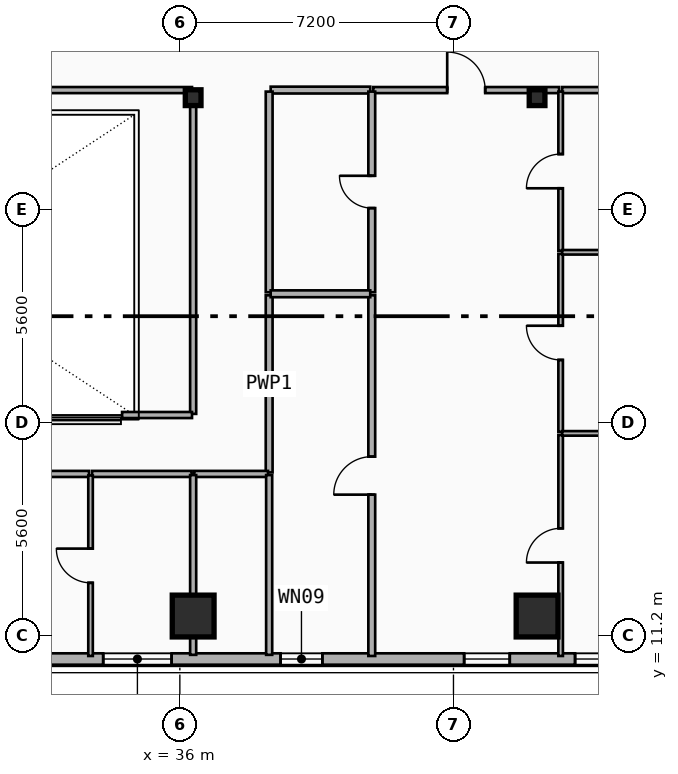
"""IFC4 building model, lengths in metres.
Left out: names, types, materials, properties, quantities, classifications, styles, units other than length and angle.
Written with IfcOpenShell. Run it as: python <this file> out.ifc"""

import sys

from ifc_helpers import new_model, si_unit, direction, frame, frame_2d, origin, origin_2d, place, context, subcontext, project, spatial, rectangle, i_section, extrude, element, fill, save


model = new_model("IFC4")
c1 = context("Model", 3, precision=1e-05, world=origin(), true_north=direction((0.0, 1.0)))
c2 = subcontext(c1, "Body", "Model", "MODEL_VIEW")
j1 = project(units=[si_unit("LENGTHUNIT", "METRE"), si_unit("PLANEANGLEUNIT", "RADIAN")], contexts=[c1])
p1 = place(None, origin())
s1 = spatial("IfcSite", under=j1, at=p1, CompositionType="ELEMENT")
p2 = place(p1, origin())
s2 = spatial("IfcBuilding", under=s1, at=p2, CompositionType="ELEMENT")
p3 = place(p2, frame((0.0, 0.0, 159.0)))
s3 = spatial("IfcBuildingStorey", under=s2, at=p3, CompositionType="ELEMENT", Elevation=159.0)
for number, where, z_axis, x_axis in (
    (1, (36.35, 25.35, 0.0), (0.0, 0.0, 1.0), (1.0, 0.0, 0.0)),
    (2, (45.4, 25.35, 0.0), (0.0, 0.0, 1.0), (1.0, 0.0, 0.0)),
):
    element("IfcColumn", number, at=place(p3, frame(where, z_axis=z_axis, x_axis=x_axis)), inside=s3, PredefinedType="COLUMN", context=c2, shape_type="SweptSolid", body=[
        extrude(i_section(OverallWidth=0.413, OverallDepth=0.415, WebThickness=0.03, FlangeThickness=0.047, FilletRadius=0.015, at=origin_2d()), origin(), (0.0, 0.0, 1.0), 3.55),
    ])
for number, where, z_axis, x_axis in (
    (3, (36.35, 11.819, 0.0), (0.0, -0.09, 0.996), (1.0, 0.0, 0.0)),
    (4, (45.4, 11.819, 0.0), (0.0, -0.09, 0.996), (1.0, 0.0, 0.0)),
):
    element("IfcColumn", number, at=place(p3, frame(where, z_axis=z_axis, x_axis=x_axis)), inside=s3, PredefinedType="COLUMN", context=c2, shape_type="SweptSolid", body=[
        extrude(rectangle(XDim=1.1, YDim=1.1, at=origin_2d()), origin(), (0.0, 0.0, 1.0), 3.565),
    ])
p4 = place(p3, frame((48.0, 10.58, 0.0), z_axis=(0.0, 0.0, 1.0), x_axis=(-1.0, 0.0, 0.0)))
e5 = element("IfcWall", 5, at=p4, inside=s3, PredefinedType="SOLIDWALL", context=c2, shape_type="SweptSolid", body=[
    extrude(rectangle(XDim=38.4, YDim=0.3, at=frame_2d((19.2, 0.0))), origin(), (0.0, 0.0, 1.0), 3.29),
])
p5 = place(p4, frame((36.407, 0.0, 0.75)))
e6 = element("IfcOpeningElement", 6, at=p5, cuts=e5, PredefinedType="OPENING", context=c2, shape_type="SweptSolid", body=[
    extrude(rectangle(XDim=1.6, YDim=1.95, at=frame_2d((0.8, 0.975))), frame((0.0, 0.16, 0.0), z_axis=(0.0, -1.0, 0.0), x_axis=(1.0, 0.0, 0.0)), (0.0, 0.0, 1.0), 0.32),
])
p6 = place(p4, frame((33.866, 0.0, 0.34)))
e7 = element("IfcOpeningElement", 7, at=p6, cuts=e5, PredefinedType="OPENING", context=c2, shape_type="SweptSolid", body=[
    extrude(rectangle(XDim=1.4, YDim=1.8, at=frame_2d((0.7, 0.9))), frame((0.0, 0.16, 0.0), z_axis=(0.0, -1.0, 0.0), x_axis=(1.0, 0.0, 0.0)), (0.0, 0.0, 1.0), 0.32),
])
p7 = place(p4, frame((27.319, 0.0, 1.05)))
e8 = element("IfcOpeningElement", 8, at=p7, cuts=e5, PredefinedType="OPENING", context=c2, shape_type="SweptSolid", body=[
    extrude(rectangle(XDim=1.2, YDim=1.5, at=frame_2d((0.6, 0.75))), frame((0.0, 0.16, 0.0), z_axis=(0.0, -1.0, 0.0), x_axis=(1.0, 0.0, 0.0)), (0.0, 0.0, 1.0), 0.32),
])
p8 = place(p4, frame((15.608, 0.0, 0.65)))
e9 = element("IfcOpeningElement", 9, at=p8, cuts=e5, PredefinedType="OPENING", context=c2, shape_type="SweptSolid", body=[
    extrude(rectangle(XDim=2.1, YDim=2.1, at=frame_2d((1.05, 1.05))), frame((0.0, 0.16, 0.0), z_axis=(0.0, -1.0, 0.0), x_axis=(1.0, 0.0, 0.0)), (0.0, 0.0, 1.0), 0.32),
])
p9 = place(p4, frame((22.175, 0.0, 0.65)))
e10 = element("IfcOpeningElement", 10, at=p9, cuts=e5, PredefinedType="OPENING", context=c2, shape_type="SweptSolid", body=[
    extrude(rectangle(XDim=2.1, YDim=2.1, at=frame_2d((1.05, 1.05))), frame((0.0, 0.16, 0.0), z_axis=(0.0, -1.0, 0.0), x_axis=(1.0, 0.0, 0.0)), (0.0, 0.0, 1.0), 0.32),
])
p10 = place(p4, frame((12.217, 0.0, 0.34)))
e11 = element("IfcOpeningElement", 11, at=p10, cuts=e5, PredefinedType="OPENING", context=c2, shape_type="SweptSolid", body=[
    extrude(rectangle(XDim=1.8, YDim=1.8, at=frame_2d((0.9, 0.9))), frame((0.0, 0.16, 0.0), z_axis=(0.0, -1.0, 0.0), x_axis=(1.0, 0.0, 0.0)), (0.0, 0.0, 1.0), 0.32),
])
p11 = place(p4, frame((3.319, 0.0, 1.05)))
e12 = element("IfcOpeningElement", 12, at=p11, cuts=e5, PredefinedType="OPENING", context=c2, shape_type="SweptSolid", body=[
    extrude(rectangle(XDim=1.2, YDim=1.5, at=frame_2d((0.6, 0.75))), frame((0.0, 0.16, 0.0), z_axis=(0.0, -1.0, 0.0), x_axis=(1.0, 0.0, 0.0)), (0.0, 0.0, 1.0), 0.32),
])
p12 = place(p4, frame((8.25, 0.0, 0.52)))
e13 = element("IfcOpeningElement", 13, at=p12, cuts=e5, PredefinedType="OPENING", context=c2, shape_type="SweptSolid", body=[
    extrude(rectangle(XDim=1.1, YDim=1.05, at=frame_2d((0.55, 0.525))), frame((0.0, 0.16, 0.0), z_axis=(0.0, -1.0, 0.0), x_axis=(1.0, 0.0, 0.0)), (0.0, 0.0, 1.0), 0.32),
])
p13 = place(p4, frame((0.4, 0.0, 0.68)))
e14 = element("IfcOpeningElement", 14, at=p13, cuts=e5, PredefinedType="OPENING", context=c2, shape_type="SweptSolid", body=[
    extrude(rectangle(XDim=1.2, YDim=1.5, at=frame_2d((0.6, 0.75))), frame((0.0, 0.16, 0.0), z_axis=(0.0, -1.0, 0.0), x_axis=(1.0, 0.0, 0.0)), (0.0, 0.0, 1.0), 0.32),
])
p14 = place(p3, frame((41.09, 25.55, 0.0), z_axis=(0.0, 0.0, 1.0), x_axis=(1.0, 0.0, 0.0)))
e15 = element("IfcWall", 15, at=p14, inside=s3, PredefinedType="PARTITIONING", context=c2, shape_type="SweptSolid", body=[
    extrude(rectangle(XDim=4.89, YDim=0.16, at=frame_2d((2.445, 0.0))), origin(), (0.0, 0.0, 1.0), 2.36),
])
p15 = place(p14, frame((1.945, 0.0, 0.0)))
e16 = element("IfcOpeningElement", 16, at=p15, cuts=e15, PredefinedType="OPENING", context=c2, shape_type="SweptSolid", body=[
    extrude(rectangle(XDim=1.0, YDim=2.15, at=frame_2d((0.5, 1.075))), frame((0.0, 0.09, 0.0), z_axis=(0.0, -1.0, 0.0), x_axis=(1.0, 0.0, 0.0)), (0.0, 0.0, 1.0), 0.18),
])
p16 = place(p3, frame((38.39, 25.55, 0.0), z_axis=(0.0, 0.0, 1.0), x_axis=(1.0, 0.0, 0.0)))
e17 = element("IfcWall", 17, at=p16, inside=s3, PredefinedType="PLUMBINGWALL", context=c2, shape_type="SweptSolid", body=[
    extrude(rectangle(XDim=2.62, YDim=0.18, at=frame_2d((1.31, 0.0))), origin(), (0.0, 0.0, 1.0), 3.29),
])
p17 = place(p3, frame((46.06, 25.55, 0.0), z_axis=(0.0, 0.0, 1.0), x_axis=(1.0, 0.0, 0.0)))
e18 = element("IfcWall", 18, at=p17, inside=s3, PredefinedType="PARTITIONING", context=c2, shape_type="SweptSolid", body=[
    extrude(rectangle(XDim=5.88, YDim=0.16, at=frame_2d((2.94, 0.0))), origin(), (0.0, 0.0, 1.0), 2.62),
])
p18 = place(p3, frame((38.35, 15.49, 0.0), z_axis=(0.0, 0.0, 1.0), x_axis=(0.0, 1.0, 0.0)))
e19 = element("IfcWall", 19, at=p18, inside=s3, PredefinedType="PLUMBINGWALL", context=c2, shape_type="SweptSolid", body=[
    extrude(rectangle(XDim=4.66, YDim=0.18, at=frame_2d((2.33, 0.0))), origin(), (0.0, 0.0, 1.0), 2.82),
])
p19 = place(p3, frame((38.35, 20.23, 0.0), z_axis=(0.0, 0.0, 1.0), x_axis=(0.0, 1.0, 0.0)))
e20 = element("IfcWall", 20, at=p19, inside=s3, PredefinedType="PLUMBINGWALL", context=c2, shape_type="SweptSolid", body=[
    extrude(rectangle(XDim=5.28, YDim=0.18, at=frame_2d((2.64, 0.0))), origin(), (0.0, 0.0, 1.0), 2.82),
])
p20 = place(p3, frame((26.79, 15.45, 0.0), z_axis=(0.0, 0.0, 1.0), x_axis=(1.0, 0.0, 0.0)))
e21 = element("IfcWall", 21, at=p20, inside=s3, PredefinedType="PARTITIONING", context=c2, shape_type="SweptSolid", body=[
    extrude(rectangle(XDim=6.82, YDim=0.16, at=frame_2d((3.41, 0.0))), origin(), (0.0, 0.0, 1.0), 2.36),
])
p21 = place(p20, frame((2.91, 0.0, 0.0)))
e22 = element("IfcOpeningElement", 22, at=p21, cuts=e21, PredefinedType="OPENING", context=c2, shape_type="SweptSolid", body=[
    extrude(rectangle(XDim=1.0, YDim=2.15, at=frame_2d((0.5, 1.075))), frame((0.0, 0.09, 0.0), z_axis=(0.0, -1.0, 0.0), x_axis=(1.0, 0.0, 0.0)), (0.0, 0.0, 1.0), 0.18),
])
p22 = place(p3, frame((33.69, 15.45, 0.0), z_axis=(0.0, 0.0, 1.0), x_axis=(1.0, 0.0, 0.0)))
e23 = element("IfcWall", 23, at=p22, inside=s3, PredefinedType="PARTITIONING", context=c2, shape_type="SweptSolid", body=[
    extrude(rectangle(XDim=2.62, YDim=0.16, at=frame_2d((1.31, 0.0))), origin(), (0.0, 0.0, 1.0), 2.36),
])
p23 = place(p3, frame((33.65, 10.66, 0.0), z_axis=(0.0, 0.0, 1.0), x_axis=(0.0, 1.0, 0.0)))
e24 = element("IfcWall", 24, at=p23, inside=s3, PredefinedType="PARTITIONING", context=c2, shape_type="SweptSolid", body=[
    extrude(rectangle(XDim=4.75, YDim=0.12, at=frame_2d((2.375, 0.0))), origin(), (0.0, 0.0, 1.0), 2.91),
])
p24 = place(p23, frame((1.925, 0.0, 0.0)))
e25 = element("IfcOpeningElement", 25, at=p24, cuts=e24, PredefinedType="OPENING", context=c2, shape_type="SweptSolid", body=[
    extrude(rectangle(XDim=0.9, YDim=2.1, at=frame_2d((0.45, 1.05))), frame((0.0, 0.07, 0.0), z_axis=(0.0, -1.0, 0.0), x_axis=(1.0, 0.0, 0.0)), (0.0, 0.0, 1.0), 0.14),
])
p25 = place(p3, frame((41.05, 10.66, 0.0), z_axis=(0.0, 0.0, 1.0), x_axis=(0.0, 1.0, 0.0)))
e26 = element("IfcWall", 26, at=p25, inside=s3, PredefinedType="PLUMBINGWALL", context=c2, shape_type="SweptSolid", body=[
    extrude(rectangle(XDim=9.49, YDim=0.18, at=frame_2d((4.745, 0.0))), origin(), (0.0, 0.0, 1.0), 2.82),
])
p26 = place(p25, frame((4.245, 0.0, 0.0)))
e27 = element("IfcOpeningElement", 27, at=p26, cuts=e26, PredefinedType="OPENING", context=c2, shape_type="SweptSolid", body=[
    extrude(rectangle(XDim=1.0, YDim=2.15, at=frame_2d((0.5, 1.075))), frame((0.0, 0.1, 0.0), z_axis=(0.0, -1.0, 0.0), x_axis=(1.0, 0.0, 0.0)), (0.0, 0.0, 1.0), 0.2),
])
p27 = place(p3, frame((41.05, 20.23, 0.0), z_axis=(0.0, 0.0, 1.0), x_axis=(0.0, 1.0, 0.0)))
e28 = element("IfcWall", 28, at=p27, inside=s3, PredefinedType="PLUMBINGWALL", context=c2, shape_type="SweptSolid", body=[
    extrude(rectangle(XDim=5.28, YDim=0.18, at=frame_2d((2.64, 0.0))), origin(), (0.0, 0.0, 1.0), 2.82),
])
p28 = place(p27, frame((2.215, 0.0, 0.0)))
e29 = element("IfcOpeningElement", 29, at=p28, cuts=e28, PredefinedType="OPENING", context=c2, shape_type="SweptSolid", body=[
    extrude(rectangle(XDim=0.85, YDim=2.1, at=frame_2d((0.425, 1.05))), frame((0.0, 0.1, 0.0), z_axis=(0.0, -1.0, 0.0), x_axis=(1.0, 0.0, 0.0)), (0.0, 0.0, 1.0), 0.2),
])
p29 = place(p3, frame((46.02, 10.66, 0.0), z_axis=(0.0, 0.0, 1.0), x_axis=(0.0, 1.0, 0.0)))
e30 = element("IfcWall", 30, at=p29, inside=s3, PredefinedType="PARTITIONING", context=c2, shape_type="SweptSolid", body=[
    extrude(rectangle(XDim=5.817, YDim=0.12, at=frame_2d((2.909, 0.0))), origin(), (0.0, 0.0, 1.0), 2.97),
])
p30 = place(p29, frame((2.458, 0.0, 0.0)))
e31 = element("IfcOpeningElement", 31, at=p30, cuts=e30, PredefinedType="OPENING", context=c2, shape_type="SweptSolid", body=[
    extrude(rectangle(XDim=0.9, YDim=2.1, at=frame_2d((0.45, 1.05))), frame((0.0, 0.07, 0.0), z_axis=(0.0, -1.0, 0.0), x_axis=(1.0, 0.0, 0.0)), (0.0, 0.0, 1.0), 0.14),
])
p31 = place(p3, frame((46.02, 16.557, 0.0), z_axis=(0.0, 0.0, 1.0), x_axis=(0.0, 1.0, 0.0)))
e32 = element("IfcWall", 32, at=p31, inside=s3, PredefinedType="PARTITIONING", context=c2, shape_type="SweptSolid", body=[
    extrude(rectangle(XDim=4.685, YDim=0.12, at=frame_2d((2.343, 0.0))), origin(), (0.0, 0.0, 1.0), 2.97),
])
p32 = place(p31, frame((1.893, 0.0, 0.0)))
e33 = element("IfcOpeningElement", 33, at=p32, cuts=e32, PredefinedType="OPENING", context=c2, shape_type="SweptSolid", body=[
    extrude(rectangle(XDim=0.9, YDim=2.1, at=frame_2d((0.45, 1.05))), frame((0.0, 0.07, 0.0), z_axis=(0.0, -1.0, 0.0), x_axis=(1.0, 0.0, 0.0)), (0.0, 0.0, 1.0), 0.14),
])
p33 = place(p3, frame((46.02, 21.322, 0.0), z_axis=(0.0, 0.0, 1.0), x_axis=(0.0, 1.0, 0.0)))
e34 = element("IfcWall", 34, at=p33, inside=s3, PredefinedType="PARTITIONING", context=c2, shape_type="SweptSolid", body=[
    extrude(rectangle(XDim=4.188, YDim=0.12, at=frame_2d((2.094, 0.0))), origin(), (0.0, 0.0, 1.0), 2.77),
])
p34 = place(p33, frame((1.644, 0.0, 0.0)))
e35 = element("IfcOpeningElement", 35, at=p34, cuts=e34, PredefinedType="OPENING", context=c2, shape_type="SweptSolid", body=[
    extrude(rectangle(XDim=0.9, YDim=2.1, at=frame_2d((0.45, 1.05))), frame((0.0, 0.07, 0.0), z_axis=(0.0, -1.0, 0.0), x_axis=(1.0, 0.0, 0.0)), (0.0, 0.0, 1.0), 0.14),
])
p35 = place(p3, frame((38.39, 20.19, 0.0), z_axis=(0.0, 0.0, 1.0), x_axis=(1.0, 0.0, 0.0)))
e36 = element("IfcWall", 36, at=p35, inside=s3, PredefinedType="PLUMBINGWALL", context=c2, shape_type="SweptSolid", body=[
    extrude(rectangle(XDim=2.62, YDim=0.18, at=frame_2d((1.31, 0.0))), origin(), (0.0, 0.0, 1.0), 3.29),
])
for number, where, z_axis, x_axis in (
    (37, (46.06, 16.517, 0.0), (0.0, 0.0, 1.0), (1.0, 0.0, 0.0)),
    (38, (46.06, 21.282, 0.0), (0.0, 0.0, 1.0), (1.0, 0.0, 0.0)),
):
    element("IfcWall", number, at=place(p3, frame(where, z_axis=z_axis, x_axis=x_axis)), inside=s3, PredefinedType="PARTITIONING", context=c2, shape_type="SweptSolid", body=[
        extrude(rectangle(XDim=5.88, YDim=0.12, at=frame_2d((2.94, 0.0))), origin(), (0.0, 0.0, 1.0), 2.62),
    ])
p36 = place(p3, frame((22.83, 25.55, 0.0), z_axis=(0.0, 0.0, 1.0), x_axis=(1.0, 0.0, 0.0)))
e39 = element("IfcWall", 39, at=p36, inside=s3, PredefinedType="PARTITIONING", context=c2, shape_type="SweptSolid", body=[
    extrude(rectangle(XDim=13.49, YDim=0.16, at=frame_2d((6.745, 0.0))), origin(), (0.0, 0.0, 1.0), 2.36),
])
p37 = place(p3, frame((36.38, 15.45, 0.0), z_axis=(0.0, 0.0, 1.0), x_axis=(1.0, 0.0, 0.0)))
e40 = element("IfcWall", 40, at=p37, inside=s3, PredefinedType="PARTITIONING", context=c2, shape_type="SweptSolid", body=[
    extrude(rectangle(XDim=1.94, YDim=0.16, at=frame_2d((0.97, 0.0))), origin(), (0.0, 0.0, 1.0), 2.36),
])
p38 = place(p3, frame((36.35, 17.03, 0.0), z_axis=(0.0, 0.0, 1.0), x_axis=(0.0, 1.0, 0.0)))
e41 = element("IfcWall", 41, at=p38, inside=s3, PredefinedType="PARTITIONING", context=c2, shape_type="SweptSolid", body=[
    extrude(rectangle(XDim=8.49, YDim=0.16, at=frame_2d((4.245, 0.0))), origin(), (0.0, 0.0, 1.0), 2.36),
])
p39 = place(p3, frame((34.48, 17.0, 0.0), z_axis=(0.0, 0.0, 1.0), x_axis=(1.0, 0.0, 0.0)))
e42 = element("IfcWall", 42, at=p39, inside=s3, PredefinedType="PARTITIONING", context=c2, shape_type="SweptSolid", body=[
    extrude(rectangle(XDim=1.84, YDim=0.16, at=frame_2d((0.92, 0.0))), origin(), (0.0, 0.0, 1.0), 2.36),
])
p40 = place(p3, frame((36.35, 10.69, 0.0), z_axis=(0.0, 0.0, 1.0), x_axis=(0.0, 1.0, 0.0)))
e43 = element("IfcWall", 43, at=p40, inside=s3, PredefinedType="PARTITIONING", context=c2, shape_type="SweptSolid", body=[
    extrude(rectangle(XDim=4.73, YDim=0.16, at=frame_2d((2.365, 0.0))), origin(), (0.0, 0.0, 1.0), 2.36),
])
p41 = place(p3, frame((38.35, 10.69, 0.0), z_axis=(0.0, 0.0, 1.0), x_axis=(0.0, 1.0, 0.0)))
e44 = element("IfcWall", 44, at=p41, inside=s3, PredefinedType="PARTITIONING", context=c2, shape_type="SweptSolid", body=[
    extrude(rectangle(XDim=4.73, YDim=0.16, at=frame_2d((2.365, 0.0))), origin(), (0.0, 0.0, 1.0), 2.82),
])
p42 = place(p10, origin())
e45 = element("IfcWindow", 45, at=p42, inside=s3, PartitioningType="SINGLE_PANEL", PredefinedType="WINDOW", context=c2, shape_type="SweptSolid", body=[
    extrude(rectangle(XDim=1.8, YDim=1.8, at=frame_2d((0.9, 0.9))), frame((0.0, 0.03, 0.0), z_axis=(0.0, -1.0, 0.0), x_axis=(1.0, 0.0, 0.0)), (0.0, 0.0, 1.0), 0.06),
])
fill(e11, e45)
p43 = place(p11, origin())
e46 = element("IfcWindow", 46, at=p43, inside=s3, PartitioningType="SINGLE_PANEL", PredefinedType="WINDOW", context=c2, shape_type="SweptSolid", body=[
    extrude(rectangle(XDim=1.2, YDim=1.5, at=frame_2d((0.6, 0.75))), frame((0.0, 0.03, 0.0), z_axis=(0.0, -1.0, 0.0), x_axis=(1.0, 0.0, 0.0)), (0.0, 0.0, 1.0), 0.06),
])
fill(e12, e46)
p44 = place(p12, origin())
e47 = element("IfcWindow", 47, at=p44, inside=s3, PartitioningType="SINGLE_PANEL", PredefinedType="WINDOW", context=c2, shape_type="SweptSolid", body=[
    extrude(rectangle(XDim=1.1, YDim=1.05, at=frame_2d((0.55, 0.525))), frame((0.0, 0.03, 0.0), z_axis=(0.0, -1.0, 0.0), x_axis=(1.0, 0.0, 0.0)), (0.0, 0.0, 1.0), 0.06),
])
fill(e13, e47)
p45 = place(p13, origin())
e48 = element("IfcWindow", 48, at=p45, inside=s3, PartitioningType="SINGLE_PANEL", PredefinedType="WINDOW", context=c2, shape_type="SweptSolid", body=[
    extrude(rectangle(XDim=1.2, YDim=1.5, at=frame_2d((0.6, 0.75))), frame((0.0, 0.03, 0.0), z_axis=(0.0, -1.0, 0.0), x_axis=(1.0, 0.0, 0.0)), (0.0, 0.0, 1.0), 0.06),
])
fill(e14, e48)
p46 = place(p15, origin())
e49 = element("IfcDoor", 49, at=p46, inside=s3, OperationType="SINGLE_SWING_LEFT", PredefinedType="DOOR", context=c2, shape_type="SweptSolid", body=[
    extrude(rectangle(XDim=1.0, YDim=2.15, at=frame_2d((0.5, 1.075))), frame((0.0, 0.025, 0.0), z_axis=(0.0, -1.0, 0.0), x_axis=(1.0, 0.0, 0.0)), (0.0, 0.0, 1.0), 0.05),
])
fill(e16, e49)
p47 = place(p24, origin())
e50 = element("IfcDoor", 50, at=p47, inside=s3, OperationType="SINGLE_SWING_RIGHT", PredefinedType="DOOR", context=c2, shape_type="SweptSolid", body=[
    extrude(rectangle(XDim=0.9, YDim=2.1, at=frame_2d((0.45, 1.05))), frame((0.0, 0.025, 0.0), z_axis=(0.0, -1.0, 0.0), x_axis=(1.0, 0.0, 0.0)), (0.0, 0.0, 1.0), 0.05),
])
fill(e25, e50)
p48 = place(p26, origin())
e51 = element("IfcDoor", 51, at=p48, inside=s3, OperationType="SINGLE_SWING_LEFT", PredefinedType="DOOR", context=c2, shape_type="SweptSolid", body=[
    extrude(rectangle(XDim=1.0, YDim=2.15, at=frame_2d((0.5, 1.075))), frame((0.0, 0.025, 0.0), z_axis=(0.0, -1.0, 0.0), x_axis=(1.0, 0.0, 0.0)), (0.0, 0.0, 1.0), 0.05),
])
fill(e27, e51)
p49 = place(p28, origin())
e52 = element("IfcDoor", 52, at=p49, inside=s3, OperationType="SINGLE_SWING_RIGHT", PredefinedType="DOOR", context=c2, shape_type="SweptSolid", body=[
    extrude(rectangle(XDim=0.85, YDim=2.1, at=frame_2d((0.425, 1.05))), frame((0.0, 0.025, 0.0), z_axis=(0.0, -1.0, 0.0), x_axis=(1.0, 0.0, 0.0)), (0.0, 0.0, 1.0), 0.05),
])
fill(e29, e52)
p50 = place(p30, origin())
e53 = element("IfcDoor", 53, at=p50, inside=s3, OperationType="SINGLE_SWING_LEFT", PredefinedType="DOOR", context=c2, shape_type="SweptSolid", body=[
    extrude(rectangle(XDim=0.9, YDim=2.1, at=frame_2d((0.45, 1.05))), frame((0.0, 0.025, 0.0), z_axis=(0.0, -1.0, 0.0), x_axis=(1.0, 0.0, 0.0)), (0.0, 0.0, 1.0), 0.05),
])
fill(e31, e53)
p51 = place(p32, origin())
e54 = element("IfcDoor", 54, at=p51, inside=s3, OperationType="SINGLE_SWING_RIGHT", PredefinedType="DOOR", context=c2, shape_type="SweptSolid", body=[
    extrude(rectangle(XDim=0.9, YDim=2.1, at=frame_2d((0.45, 1.05))), frame((0.0, 0.025, 0.0), z_axis=(0.0, -1.0, 0.0), x_axis=(1.0, 0.0, 0.0)), (0.0, 0.0, 1.0), 0.05),
])
fill(e33, e54)
p52 = place(p34, origin())
e55 = element("IfcDoor", 55, at=p52, inside=s3, OperationType="SINGLE_SWING_LEFT", PredefinedType="DOOR", context=c2, shape_type="SweptSolid", body=[
    extrude(rectangle(XDim=0.9, YDim=2.1, at=frame_2d((0.45, 1.05))), frame((0.0, 0.025, 0.0), z_axis=(0.0, -1.0, 0.0), x_axis=(1.0, 0.0, 0.0)), (0.0, 0.0, 1.0), 0.05),
])
fill(e35, e55)
save(model, sys.argv[1])
